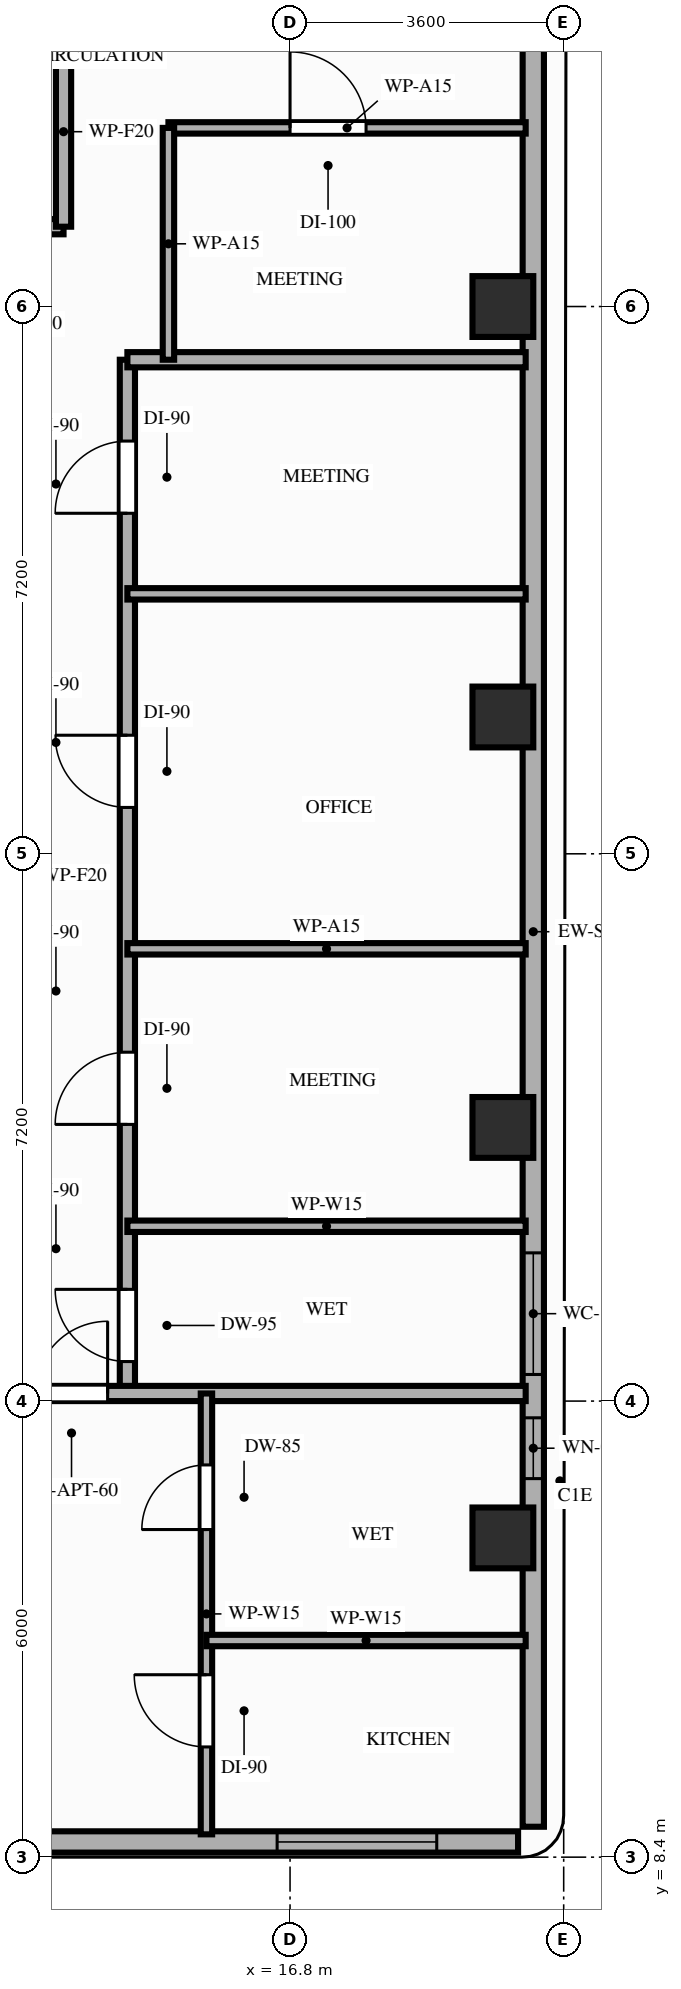
"""IFC4 building model, lengths in metres.
Left out: names, types, materials, properties, quantities, classifications, styles, units other than length and angle.
Written with IfcOpenShell. Run it as: python <this file> out.ifc"""

import sys

from ifc_helpers import new_model, si_unit, direction, frame, frame_2d, origin, origin_2d, place, context, subcontext, project, spatial, rectangle, extrude, element, fill, save


model = new_model("IFC4")
c1 = context("Model", 3, precision=1e-05, world=origin(), true_north=direction((0.0, 1.0)))
c2 = subcontext(c1, "Body", "Model", "MODEL_VIEW")
j1 = project(units=[si_unit("LENGTHUNIT", "METRE"), si_unit("PLANEANGLEUNIT", "RADIAN")], contexts=[c1])
p1 = place(None, origin())
s1 = spatial("IfcSite", under=j1, at=p1, CompositionType="ELEMENT")
p2 = place(p1, origin())
s2 = spatial("IfcBuilding", under=s1, at=p2, CompositionType="ELEMENT")
p3 = place(p2, frame((0.0, 0.0, 228.0)))
s3 = spatial("IfcBuildingStorey", under=s2, at=p3, CompositionType="ELEMENT", Elevation=228.0)
for number, where, z_axis, x_axis in (
    (1, (19.6, 12.6, 0.0), (0.0, 0.0, 1.0), (1.0, 0.0, 0.0)),
    (2, (19.6, 18.0, 0.0), (0.0, 0.0, 1.0), (1.0, 0.0, 0.0)),
    (3, (19.6, 23.4, 0.0), (0.0, 0.0, 1.0), (1.0, 0.0, 0.0)),
    (4, (19.6, 28.8, 0.0), (0.0, 0.0, 1.0), (1.0, 0.0, 0.0)),
):
    element("IfcColumn", number, at=place(p3, frame(where, z_axis=z_axis, x_axis=x_axis)), inside=s3, PredefinedType="COLUMN", context=c2, shape_type="SweptSolid", body=[
        extrude(rectangle(XDim=0.8, YDim=0.8, at=origin_2d()), origin(), (0.0, 0.0, 1.0), 3.2),
    ])
p4 = place(p3, frame((4.0, 8.6, 0.0), z_axis=(0.0, 0.0, 1.0), x_axis=(1.0, 0.0, 0.0)))
e5 = element("IfcWall", 5, at=p4, inside=s3, PredefinedType="STANDARD", context=c2, shape_type="SweptSolid", body=[
    extrude(rectangle(XDim=15.8, YDim=0.28, at=frame_2d((7.9, 0.0))), origin(), (0.0, 0.0, 1.0), 3.02),
])
p5 = place(p4, frame((6.7, 0.0, 0.85)))
e6 = element("IfcOpeningElement", 6, at=p5, cuts=e5, PredefinedType="OPENING", context=c2, shape_type="SweptSolid", body=[
    extrude(rectangle(XDim=2.1, YDim=1.8, at=frame_2d((1.05, 0.9))), frame((0.0, 0.15, 0.0), z_axis=(0.0, -1.0, 0.0), x_axis=(1.0, 0.0, 0.0)), (0.0, 0.0, 1.0), 0.3),
])
p6 = place(p4, frame((12.63, 0.0, 0.85)))
e7 = element("IfcOpeningElement", 7, at=p6, cuts=e5, PredefinedType="OPENING", context=c2, shape_type="SweptSolid", body=[
    extrude(rectangle(XDim=2.1, YDim=1.8, at=frame_2d((1.05, 0.9))), frame((0.0, 0.15, 0.0), z_axis=(0.0, -1.0, 0.0), x_axis=(1.0, 0.0, 0.0)), (0.0, 0.0, 1.0), 0.3),
])
p7 = place(p3, frame((20.0, 8.8, 0.0), z_axis=(0.0, 0.0, 1.0), x_axis=(0.0, 1.0, 0.0)))
e8 = element("IfcWall", 8, at=p7, inside=s3, PredefinedType="STANDARD", context=c2, shape_type="SweptSolid", body=[
    extrude(rectangle(XDim=23.55, YDim=0.28, at=frame_2d((11.775, 0.0))), origin(), (0.0, 0.0, 1.0), 2.51),
])
p8 = place(p7, frame((4.58, 0.0, 0.85)))
e9 = element("IfcOpeningElement", 9, at=p8, cuts=e8, PredefinedType="OPENING", context=c2, shape_type="SweptSolid", body=[
    extrude(rectangle(XDim=0.8, YDim=1.41, at=frame_2d((0.4, 0.705))), frame((0.0, 0.15, 0.0), z_axis=(0.0, -1.0, 0.0), x_axis=(1.0, 0.0, 0.0)), (0.0, 0.0, 1.0), 0.3),
])
p9 = place(p7, frame((5.95, 0.0, 0.85)))
e10 = element("IfcOpeningElement", 10, at=p9, cuts=e8, PredefinedType="OPENING", context=c2, shape_type="SweptSolid", body=[
    extrude(rectangle(XDim=1.6, YDim=1.41, at=frame_2d((0.8, 0.705))), frame((0.0, 0.15, 0.0), z_axis=(0.0, -1.0, 0.0), x_axis=(1.0, 0.0, 0.0)), (0.0, 0.0, 1.0), 0.3),
])
p10 = place(p3, frame((12.55, 29.85, 0.0), z_axis=(0.0, 0.0, 1.0), x_axis=(1.0, 0.0, 0.0)))
e11 = element("IfcWall", 11, at=p10, inside=s3, PredefinedType="PARTITIONING", context=c2, shape_type="SweptSolid", body=[
    extrude(rectangle(XDim=1.27, YDim=0.2, at=frame_2d((0.635, 0.0))), origin(), (0.0, 0.0, 1.0), 3.02),
])
p11 = place(p10, frame((0.21, 0.0, 0.0)))
e12 = element("IfcOpeningElement", 12, at=p11, cuts=e11, PredefinedType="OPENING", context=c2, shape_type="SweptSolid", body=[
    extrude(rectangle(XDim=0.85, YDim=2.05, at=frame_2d((0.425, 1.025))), frame((0.0, 0.11, 0.0), z_axis=(0.0, -1.0, 0.0), x_axis=(1.0, 0.0, 0.0)), (0.0, 0.0, 1.0), 0.22),
])
p12 = place(p3, frame((13.82, 29.85, 0.0), z_axis=(0.0, 0.0, 1.0), x_axis=(0.0, 1.0, 0.0)))
e13 = element("IfcWall", 13, at=p12, inside=s3, PredefinedType="PARTITIONING", context=c2, shape_type="SweptSolid", body=[
    extrude(rectangle(XDim=2.5, YDim=0.2, at=frame_2d((1.25, 0.0))), origin(), (0.0, 0.0, 1.0), 3.02),
])
p13 = place(p3, frame((14.66, 14.5, 0.0), z_axis=(0.0, 0.0, 1.0), x_axis=(0.0, 1.0, 0.0)))
e14 = element("IfcWall", 14, at=p13, inside=s3, PredefinedType="PARTITIONING", context=c2, shape_type="SweptSolid", body=[
    extrude(rectangle(XDim=13.6, YDim=0.2, at=frame_2d((6.8, 0.0))), origin(), (0.0, 0.0, 1.0), 2.51),
])
p14 = place(p13, frame((0.42, 0.0, 0.0)))
e15 = element("IfcOpeningElement", 15, at=p14, cuts=e14, PredefinedType="OPENING", context=c2, shape_type="SweptSolid", body=[
    extrude(rectangle(XDim=0.95, YDim=2.1, at=frame_2d((0.475, 1.05))), frame((0.0, 0.11, 0.0), z_axis=(0.0, -1.0, 0.0), x_axis=(1.0, 0.0, 0.0)), (0.0, 0.0, 1.0), 0.22),
])
p15 = place(p13, frame((3.54, 0.0, 0.0)))
e16 = element("IfcOpeningElement", 16, at=p15, cuts=e14, PredefinedType="OPENING", context=c2, shape_type="SweptSolid", body=[
    extrude(rectangle(XDim=0.95, YDim=2.15, at=frame_2d((0.475, 1.075))), frame((0.0, 0.11, 0.0), z_axis=(0.0, -1.0, 0.0), x_axis=(1.0, 0.0, 0.0)), (0.0, 0.0, 1.0), 0.22),
])
p16 = place(p13, frame((7.71, 0.0, 0.0)))
e17 = element("IfcOpeningElement", 17, at=p16, cuts=e14, PredefinedType="OPENING", context=c2, shape_type="SweptSolid", body=[
    extrude(rectangle(XDim=0.95, YDim=2.15, at=frame_2d((0.475, 1.075))), frame((0.0, 0.11, 0.0), z_axis=(0.0, -1.0, 0.0), x_axis=(1.0, 0.0, 0.0)), (0.0, 0.0, 1.0), 0.22),
])
p17 = place(p13, frame((11.58, 0.0, 0.0)))
e18 = element("IfcOpeningElement", 18, at=p17, cuts=e14, PredefinedType="OPENING", context=c2, shape_type="SweptSolid", body=[
    extrude(rectangle(XDim=0.95, YDim=2.15, at=frame_2d((0.475, 1.075))), frame((0.0, 0.11, 0.0), z_axis=(0.0, -1.0, 0.0), x_axis=(1.0, 0.0, 0.0)), (0.0, 0.0, 1.0), 0.22),
])
p18 = place(p3, frame((3.9, 14.5, 0.0), z_axis=(0.0, 0.0, 1.0), x_axis=(1.0, 0.0, 0.0)))
e19 = element("IfcWall", 19, at=p18, inside=s3, PredefinedType="PARTITIONING", context=c2, shape_type="SweptSolid", body=[
    extrude(rectangle(XDim=16.0, YDim=0.2, at=frame_2d((8.0, 0.0))), origin(), (0.0, 0.0, 1.0), 2.51),
])
p19 = place(p18, frame((9.55, 0.0, 0.0)))
e20 = element("IfcOpeningElement", 20, at=p19, cuts=e19, PredefinedType="OPENING", context=c2, shape_type="SweptSolid", body=[
    extrude(rectangle(XDim=0.95, YDim=2.15, at=frame_2d((0.475, 1.075))), frame((0.0, 0.11, 0.0), z_axis=(0.0, -1.0, 0.0), x_axis=(1.0, 0.0, 0.0)), (0.0, 0.0, 1.0), 0.22),
])
p20 = place(p3, frame((14.66, 28.1, 0.0), z_axis=(0.0, 0.0, 1.0), x_axis=(1.0, 0.0, 0.0)))
e21 = element("IfcWall", 21, at=p20, inside=s3, PredefinedType="PARTITIONING", context=c2, shape_type="SweptSolid", body=[
    extrude(rectangle(XDim=5.24, YDim=0.2, at=frame_2d((2.62, 0.0))), origin(), (0.0, 0.0, 1.0), 2.51),
])
p21 = place(p3, frame((15.2, 31.15, 0.0), z_axis=(0.0, 0.0, 1.0), x_axis=(1.0, 0.0, 0.0)))
e22 = element("IfcWall", 22, at=p21, inside=s3, PredefinedType="PARTITIONING", context=c2, shape_type="SweptSolid", body=[
    extrude(rectangle(XDim=4.7, YDim=0.15, at=frame_2d((2.35, 0.0))), origin(), (0.0, 0.0, 1.0), 2.51),
])
p22 = place(p21, frame((1.6, 0.0, 0.0)))
e23 = element("IfcOpeningElement", 23, at=p22, cuts=e22, PredefinedType="OPENING", context=c2, shape_type="SweptSolid", body=[
    extrude(rectangle(XDim=1.0, YDim=2.15, at=frame_2d((0.5, 1.075))), frame((0.0, 0.085, 0.0), z_axis=(0.0, -1.0, 0.0), x_axis=(1.0, 0.0, 0.0)), (0.0, 0.0, 1.0), 0.17),
])
p23 = place(p3, frame((15.2, 28.1, 0.0), z_axis=(0.0, 0.0, 1.0), x_axis=(0.0, 1.0, 0.0)))
e24 = element("IfcWall", 24, at=p23, inside=s3, PredefinedType="PARTITIONING", context=c2, shape_type="SweptSolid", body=[
    extrude(rectangle(XDim=3.05, YDim=0.15, at=frame_2d((1.525, 0.0))), origin(), (0.0, 0.0, 1.0), 2.51),
])
p24 = place(p3, frame((15.7, 8.7, 0.0), z_axis=(0.0, 0.0, 1.0), x_axis=(0.0, 1.0, 0.0)))
e25 = element("IfcWall", 25, at=p24, inside=s3, PredefinedType="PARTITIONING", context=c2, shape_type="SweptSolid", body=[
    extrude(rectangle(XDim=5.8, YDim=0.15, at=frame_2d((2.9, 0.0))), origin(), (0.0, 0.0, 1.0), 2.51),
])
p25 = place(p24, frame((1.15, 0.0, 0.0)))
e26 = element("IfcOpeningElement", 26, at=p25, cuts=e25, PredefinedType="OPENING", context=c2, shape_type="SweptSolid", body=[
    extrude(rectangle(XDim=0.95, YDim=2.15, at=frame_2d((0.475, 1.075))), frame((0.0, 0.085, 0.0), z_axis=(0.0, -1.0, 0.0), x_axis=(1.0, 0.0, 0.0)), (0.0, 0.0, 1.0), 0.17),
])
p26 = place(p24, frame((4.01, 0.0, 0.0)))
e27 = element("IfcOpeningElement", 27, at=p26, cuts=e25, PredefinedType="OPENING", context=c2, shape_type="SweptSolid", body=[
    extrude(rectangle(XDim=0.85, YDim=2.1, at=frame_2d((0.425, 1.05))), frame((0.0, 0.085, 0.0), z_axis=(0.0, -1.0, 0.0), x_axis=(1.0, 0.0, 0.0)), (0.0, 0.0, 1.0), 0.17),
])
p27 = place(p3, frame((15.7, 11.25, 0.0), z_axis=(0.0, 0.0, 1.0), x_axis=(1.0, 0.0, 0.0)))
e28 = element("IfcWall", 28, at=p27, inside=s3, PredefinedType="PARTITIONING", context=c2, shape_type="SweptSolid", body=[
    extrude(rectangle(XDim=4.2, YDim=0.15, at=frame_2d((2.1, 0.0))), origin(), (0.0, 0.0, 1.0), 3.02),
])
for number, where, z_axis, x_axis in (
    (29, (14.66, 16.7, 0.0), (0.0, 0.0, 1.0), (1.0, 0.0, 0.0)),
    (30, (14.66, 20.35, 0.0), (0.0, 0.0, 1.0), (1.0, 0.0, 0.0)),
    (31, (14.66, 25.02, 0.0), (0.0, 0.0, 1.0), (1.0, 0.0, 0.0)),
):
    element("IfcWall", number, at=place(p3, frame(where, z_axis=z_axis, x_axis=x_axis)), inside=s3, PredefinedType="PARTITIONING", context=c2, shape_type="SweptSolid", body=[
        extrude(rectangle(XDim=5.24, YDim=0.15, at=frame_2d((2.62, 0.0))), origin(), (0.0, 0.0, 1.0), 2.51),
    ])
p28 = place(p6, origin())
e32 = element("IfcWindow", 32, at=p28, inside=s3, PartitioningType="SINGLE_PANEL", PredefinedType="WINDOW", context=c2, shape_type="SweptSolid", body=[
    extrude(rectangle(XDim=2.1, YDim=1.8, at=frame_2d((1.05, 0.9))), frame((0.0, 0.03, 0.0), z_axis=(0.0, -1.0, 0.0), x_axis=(1.0, 0.0, 0.0)), (0.0, 0.0, 1.0), 0.06),
])
fill(e7, e32)
p29 = place(p8, origin())
e33 = element("IfcWindow", 33, at=p29, inside=s3, PartitioningType="SINGLE_PANEL", PredefinedType="WINDOW", context=c2, shape_type="SweptSolid", body=[
    extrude(rectangle(XDim=0.8, YDim=1.41, at=frame_2d((0.4, 0.705))), frame((0.0, 0.03, 0.0), z_axis=(0.0, -1.0, 0.0), x_axis=(1.0, 0.0, 0.0)), (0.0, 0.0, 1.0), 0.06),
])
fill(e9, e33)
p30 = place(p9, origin())
e34 = element("IfcWindow", 34, at=p30, inside=s3, PartitioningType="SINGLE_PANEL", PredefinedType="WINDOW", context=c2, shape_type="SweptSolid", body=[
    extrude(rectangle(XDim=1.6, YDim=1.41, at=frame_2d((0.8, 0.705))), frame((0.0, 0.03, 0.0), z_axis=(0.0, -1.0, 0.0), x_axis=(1.0, 0.0, 0.0)), (0.0, 0.0, 1.0), 0.06),
])
fill(e10, e34)
p31 = place(p22, origin())
e35 = element("IfcDoor", 35, at=p31, inside=s3, OperationType="SINGLE_SWING_LEFT", PredefinedType="DOOR", context=c2, shape_type="SweptSolid", body=[
    extrude(rectangle(XDim=1.0, YDim=2.15, at=frame_2d((0.5, 1.075))), frame((0.0, 0.025, 0.0), z_axis=(0.0, -1.0, 0.0), x_axis=(1.0, 0.0, 0.0)), (0.0, 0.0, 1.0), 0.05),
])
fill(e23, e35)
p32 = place(p19, origin())
e36 = element("IfcDoor", 36, at=p32, inside=s3, OperationType="SINGLE_SWING_RIGHT", PredefinedType="DOOR", context=c2, shape_type="SweptSolid", body=[
    extrude(rectangle(XDim=0.95, YDim=2.15, at=frame_2d((0.475, 1.075))), frame((0.0, 0.025, 0.0), z_axis=(0.0, -1.0, 0.0), x_axis=(1.0, 0.0, 0.0)), (0.0, 0.0, 1.0), 0.05),
])
fill(e20, e36)
p33 = place(p25, origin())
e37 = element("IfcDoor", 37, at=p33, inside=s3, OperationType="SINGLE_SWING_RIGHT", PredefinedType="DOOR", context=c2, shape_type="SweptSolid", body=[
    extrude(rectangle(XDim=0.95, YDim=2.15, at=frame_2d((0.475, 1.075))), frame((0.0, 0.025, 0.0), z_axis=(0.0, -1.0, 0.0), x_axis=(1.0, 0.0, 0.0)), (0.0, 0.0, 1.0), 0.05),
])
fill(e26, e37)
p34 = place(p26, origin())
e38 = element("IfcDoor", 38, at=p34, inside=s3, OperationType="SINGLE_SWING_LEFT", PredefinedType="DOOR", context=c2, shape_type="SweptSolid", body=[
    extrude(rectangle(XDim=0.85, YDim=2.1, at=frame_2d((0.425, 1.05))), frame((0.0, 0.025, 0.0), z_axis=(0.0, -1.0, 0.0), x_axis=(1.0, 0.0, 0.0)), (0.0, 0.0, 1.0), 0.05),
])
fill(e27, e38)
p35 = place(p14, origin())
e39 = element("IfcDoor", 39, at=p35, inside=s3, OperationType="SINGLE_SWING_RIGHT", PredefinedType="DOOR", context=c2, shape_type="SweptSolid", body=[
    extrude(rectangle(XDim=0.95, YDim=2.1, at=frame_2d((0.475, 1.05))), frame((0.0, 0.025, 0.0), z_axis=(0.0, -1.0, 0.0), x_axis=(1.0, 0.0, 0.0)), (0.0, 0.0, 1.0), 0.05),
])
fill(e15, e39)
p36 = place(p15, origin())
e40 = element("IfcDoor", 40, at=p36, inside=s3, OperationType="SINGLE_SWING_LEFT", PredefinedType="DOOR", context=c2, shape_type="SweptSolid", body=[
    extrude(rectangle(XDim=0.95, YDim=2.15, at=frame_2d((0.475, 1.075))), frame((0.0, 0.025, 0.0), z_axis=(0.0, -1.0, 0.0), x_axis=(1.0, 0.0, 0.0)), (0.0, 0.0, 1.0), 0.05),
])
fill(e16, e40)
p37 = place(p16, origin())
e41 = element("IfcDoor", 41, at=p37, inside=s3, OperationType="SINGLE_SWING_RIGHT", PredefinedType="DOOR", context=c2, shape_type="SweptSolid", body=[
    extrude(rectangle(XDim=0.95, YDim=2.15, at=frame_2d((0.475, 1.075))), frame((0.0, 0.025, 0.0), z_axis=(0.0, -1.0, 0.0), x_axis=(1.0, 0.0, 0.0)), (0.0, 0.0, 1.0), 0.05),
])
fill(e17, e41)
p38 = place(p17, origin())
e42 = element("IfcDoor", 42, at=p38, inside=s3, OperationType="SINGLE_SWING_LEFT", PredefinedType="DOOR", context=c2, shape_type="SweptSolid", body=[
    extrude(rectangle(XDim=0.95, YDim=2.15, at=frame_2d((0.475, 1.075))), frame((0.0, 0.025, 0.0), z_axis=(0.0, -1.0, 0.0), x_axis=(1.0, 0.0, 0.0)), (0.0, 0.0, 1.0), 0.05),
])
fill(e18, e42)
save(model, sys.argv[1])
